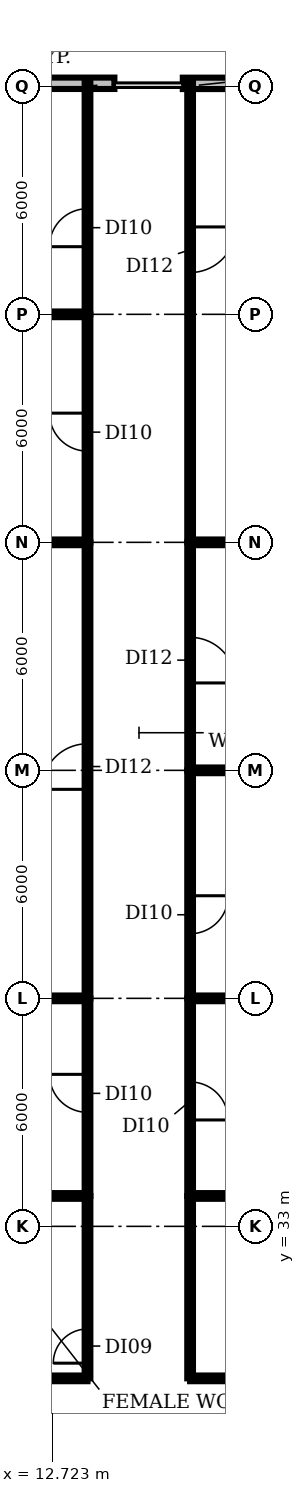
"""IFC4 building model, lengths in metres.
Left out: names, types, materials, properties, quantities, classifications, styles, units other than length and angle.
Written with IfcOpenShell. Run it as: python <this file> out.ifc"""

import sys

from ifc_helpers import new_model, si_unit, direction, frame, frame_2d, origin, place, context, subcontext, project, spatial, rectangle, extrude, element, fill, save


model = new_model("IFC4")
c1 = context("Model", 3, precision=1e-05, world=origin(), true_north=direction((0.0, 1.0)))
c2 = subcontext(c1, "Body", "Model", "MODEL_VIEW")
j1 = project(units=[si_unit("LENGTHUNIT", "METRE"), si_unit("PLANEANGLEUNIT", "RADIAN")], contexts=[c1])
p1 = place(None, origin())
s1 = spatial("IfcSite", under=j1, at=p1, CompositionType="ELEMENT")
p2 = place(p1, origin())
s2 = spatial("IfcBuilding", under=s1, at=p2, CompositionType="ELEMENT")
p3 = place(p2, frame((0.0, 0.0, 306.2)))
s3 = spatial("IfcBuildingStorey", under=s2, at=p3, CompositionType="ELEMENT", Elevation=306.2)
p4 = place(p3, frame((25.03, 63.078, 0.0), z_axis=(0.0, 0.0, 1.0), x_axis=(-1.0, 0.0, 0.0)))
e1 = element("IfcWall", 1, at=p4, inside=s3, PredefinedType="SOLIDWALL", context=c2, shape_type="SweptSolid", body=[
    extrude(rectangle(XDim=8.873, YDim=0.3, at=frame_2d((4.436, 0.0))), origin(), (0.0, 0.0, 1.0), 3.85),
])
p5 = place(p3, frame((14.357, 63.08, 0.0), z_axis=(0.0, 0.0, 1.0), x_axis=(-1.0, 0.0, 0.0)))
e2 = element("IfcWall", 2, at=p5, inside=s3, PredefinedType="SOLIDWALL", context=c2, shape_type="SweptSolid", body=[
    extrude(rectangle(XDim=4.715, YDim=0.3, at=frame_2d((2.357, 0.0))), origin(), (0.0, 0.0, 1.0), 3.85),
])
p6 = place(p3, frame((-3.28, 57.0, 0.0), z_axis=(0.0, 0.0, 1.0), x_axis=(1.0, 0.0, 0.0)))
e3 = element("IfcWall", 3, at=p6, inside=s3, PredefinedType="PARTITIONING", context=c2, shape_type="SweptSolid", body=[
    extrude(rectangle(XDim=16.93, YDim=0.15, at=frame_2d((8.465, 0.0))), origin(), (0.0, 0.0, 1.0), 2.9),
])
p7 = place(p3, frame((-2.81, 51.0, 0.0), z_axis=(0.0, 0.0, 1.0), x_axis=(1.0, 0.0, 0.0)))
e4 = element("IfcWall", 4, at=p7, inside=s3, PredefinedType="PARTITIONING", context=c2, shape_type="SweptSolid", body=[
    extrude(rectangle(XDim=16.46, YDim=0.15, at=frame_2d((8.23, 0.0))), origin(), (0.0, 0.0, 1.0), 2.9),
])
p8 = place(p3, frame((-1.856, 39.0, 0.0), z_axis=(0.0, 0.0, 1.0), x_axis=(1.0, 0.0, 0.0)))
e5 = element("IfcWall", 5, at=p8, inside=s3, PredefinedType="PARTITIONING", context=c2, shape_type="SweptSolid", body=[
    extrude(rectangle(XDim=15.506, YDim=0.15, at=frame_2d((7.753, 0.0))), origin(), (0.0, 0.0, 1.0), 2.9),
])
p9 = place(p3, frame((-1.45, 33.8, 0.0), z_axis=(0.0, 0.0, 1.0), x_axis=(1.0, 0.0, 0.0)))
e6 = element("IfcWall", 6, at=p9, inside=s3, PredefinedType="PARTITIONING", context=c2, shape_type="SweptSolid", body=[
    extrude(rectangle(XDim=15.1, YDim=0.15, at=frame_2d((7.55, 0.0))), origin(), (0.0, 0.0, 1.0), 2.9),
])
p10 = place(p3, frame((8.8, 29.0, 0.0), z_axis=(0.0, 0.0, 1.0), x_axis=(1.0, 0.0, 0.0)))
e7 = element("IfcWall", 7, at=p10, inside=s3, PredefinedType="PARTITIONING", context=c2, shape_type="SweptSolid", body=[
    extrude(rectangle(XDim=4.85, YDim=0.15, at=frame_2d((2.425, 0.0))), origin(), (0.0, 0.0, 1.0), 2.9),
])
p11 = place(p3, frame((13.65, 29.0, 0.0), z_axis=(0.0, 0.0, 1.0), x_axis=(0.0, 1.0, 0.0)))
e8 = element("IfcWall", 8, at=p11, inside=s3, PredefinedType="PARTITIONING", context=c2, shape_type="SweptSolid", body=[
    extrude(rectangle(XDim=4.8, YDim=0.15, at=frame_2d((2.4, 0.0))), origin(), (0.0, 0.0, 1.0), 2.9),
])
p12 = place(p11, frame((0.4, 0.0, 0.0)))
e9 = element("IfcOpeningElement", 9, at=p12, cuts=e8, PredefinedType="OPENING", context=c2, shape_type="SweptSolid", body=[
    extrude(rectangle(XDim=0.9, YDim=2.1, at=frame_2d((0.45, 1.05))), frame((0.0, 0.085, 0.0), z_axis=(0.0, -1.0, 0.0), x_axis=(1.0, 0.0, 0.0)), (0.0, 0.0, 1.0), 0.17),
])
p13 = place(p3, frame((13.65, 33.8, 0.0), z_axis=(0.0, 0.0, 1.0), x_axis=(0.0, 1.0, 0.0)))
e10 = element("IfcWall", 10, at=p13, inside=s3, PredefinedType="PARTITIONING", context=c2, shape_type="SweptSolid", body=[
    extrude(rectangle(XDim=5.2, YDim=0.15, at=frame_2d((2.6, 0.0))), origin(), (0.0, 0.0, 1.0), 2.9),
])
p14 = place(p13, frame((2.2, 0.0, 0.0)))
e11 = element("IfcOpeningElement", 11, at=p14, cuts=e10, PredefinedType="OPENING", context=c2, shape_type="SweptSolid", body=[
    extrude(rectangle(XDim=1.0, YDim=2.1, at=frame_2d((0.5, 1.05))), frame((0.0, 0.085, 0.0), z_axis=(0.0, -1.0, 0.0), x_axis=(1.0, 0.0, 0.0)), (0.0, 0.0, 1.0), 0.17),
])
p15 = place(p3, frame((13.65, 39.0, 0.0), z_axis=(0.0, 0.0, 1.0), x_axis=(0.0, 1.0, 0.0)))
e12 = element("IfcWall", 12, at=p15, inside=s3, PredefinedType="PARTITIONING", context=c2, shape_type="SweptSolid", body=[
    extrude(rectangle(XDim=12.0, YDim=0.15, at=frame_2d((6.0, 0.0))), origin(), (0.0, 0.0, 1.0), 2.9),
])
p16 = place(p15, frame((5.5, 0.0, 0.0)))
e13 = element("IfcOpeningElement", 13, at=p16, cuts=e12, PredefinedType="OPENING", context=c2, shape_type="SweptSolid", body=[
    extrude(rectangle(XDim=1.2, YDim=2.1, at=frame_2d((0.6, 1.05))), frame((0.0, 0.085, 0.0), z_axis=(0.0, -1.0, 0.0), x_axis=(1.0, 0.0, 0.0)), (0.0, 0.0, 1.0), 0.17),
])
p17 = place(p3, frame((13.65, 51.0, 0.0), z_axis=(0.0, 0.0, 1.0), x_axis=(0.0, 1.0, 0.0)))
e14 = element("IfcWall", 14, at=p17, inside=s3, PredefinedType="PARTITIONING", context=c2, shape_type="SweptSolid", body=[
    extrude(rectangle(XDim=6.0, YDim=0.15, at=frame_2d((3.0, 0.0))), origin(), (0.0, 0.0, 1.0), 2.9),
])
p18 = place(p17, frame((2.4, 0.0, 0.0)))
e15 = element("IfcOpeningElement", 15, at=p18, cuts=e14, PredefinedType="OPENING", context=c2, shape_type="SweptSolid", body=[
    extrude(rectangle(XDim=1.0, YDim=2.1, at=frame_2d((0.5, 1.05))), frame((0.0, 0.085, 0.0), z_axis=(0.0, -1.0, 0.0), x_axis=(1.0, 0.0, 0.0)), (0.0, 0.0, 1.0), 0.17),
])
p19 = place(p3, frame((13.65, 57.0, 0.0), z_axis=(0.0, 0.0, 1.0), x_axis=(0.0, 1.0, 0.0)))
e16 = element("IfcWall", 16, at=p19, inside=s3, PredefinedType="PARTITIONING", context=c2, shape_type="SweptSolid", body=[
    extrude(rectangle(XDim=6.09, YDim=0.15, at=frame_2d((3.045, 0.0))), origin(), (0.0, 0.0, 1.0), 2.9),
])
p20 = place(p19, frame((1.78, 0.0, 0.0)))
e17 = element("IfcOpeningElement", 17, at=p20, cuts=e16, PredefinedType="OPENING", context=c2, shape_type="SweptSolid", body=[
    extrude(rectangle(XDim=1.0, YDim=2.1, at=frame_2d((0.5, 1.05))), frame((0.0, 0.085, 0.0), z_axis=(0.0, -1.0, 0.0), x_axis=(1.0, 0.0, 0.0)), (0.0, 0.0, 1.0), 0.17),
])
p21 = place(p3, frame((16.35, 29.0, 0.0), z_axis=(0.0, 0.0, 1.0), x_axis=(0.0, 1.0, 0.0)))
e18 = element("IfcWall", 18, at=p21, inside=s3, PredefinedType="PARTITIONING", context=c2, shape_type="SweptSolid", body=[
    extrude(rectangle(XDim=4.8, YDim=0.15, at=frame_2d((2.4, 0.0))), origin(), (0.0, 0.0, 1.0), 2.9),
])
p22 = place(p3, frame((16.35, 29.0, 0.0), z_axis=(0.0, 0.0, 1.0), x_axis=(1.0, 0.0, 0.0)))
e19 = element("IfcWall", 19, at=p22, inside=s3, PredefinedType="PARTITIONING", context=c2, shape_type="SweptSolid", body=[
    extrude(rectangle(XDim=5.03, YDim=0.15, at=frame_2d((2.515, 0.0))), origin(), (0.0, 0.0, 1.0), 2.9),
])
p23 = place(p3, frame((16.35, 33.8, 0.0), z_axis=(0.0, 0.0, 1.0), x_axis=(1.0, 0.0, 0.0)))
e20 = element("IfcWall", 20, at=p23, inside=s3, PredefinedType="PARTITIONING", context=c2, shape_type="SweptSolid", body=[
    extrude(rectangle(XDim=8.63, YDim=0.15, at=frame_2d((4.315, 0.0))), origin(), (0.0, 0.0, 1.0), 2.9),
])
p24 = place(p3, frame((16.35, 39.0, 0.0), z_axis=(0.0, 0.0, 1.0), x_axis=(0.0, -1.0, 0.0)))
e21 = element("IfcWall", 21, at=p24, inside=s3, PredefinedType="PARTITIONING", context=c2, shape_type="SweptSolid", body=[
    extrude(rectangle(XDim=5.2, YDim=0.15, at=frame_2d((2.6, 0.0))), origin(), (0.0, 0.0, 1.0), 2.9),
])
p25 = place(p24, frame((2.2, 0.0, 0.0)))
e22 = element("IfcOpeningElement", 22, at=p25, cuts=e21, PredefinedType="OPENING", context=c2, shape_type="SweptSolid", body=[
    extrude(rectangle(XDim=1.0, YDim=2.1, at=frame_2d((0.5, 1.05))), frame((0.0, 0.085, 0.0), z_axis=(0.0, -1.0, 0.0), x_axis=(1.0, 0.0, 0.0)), (0.0, 0.0, 1.0), 0.17),
])
p26 = place(p3, frame((16.35, 39.0, 0.0), z_axis=(0.0, 0.0, 1.0), x_axis=(1.0, 0.0, 0.0)))
e23 = element("IfcWall", 23, at=p26, inside=s3, PredefinedType="PARTITIONING", context=c2, shape_type="SweptSolid", body=[
    extrude(rectangle(XDim=8.63, YDim=0.15, at=frame_2d((4.315, 0.0))), origin(), (0.0, 0.0, 1.0), 2.9),
])
p27 = place(p3, frame((16.35, 45.0, 0.0), z_axis=(0.0, 0.0, 1.0), x_axis=(0.0, -1.0, 0.0)))
e24 = element("IfcWall", 24, at=p27, inside=s3, PredefinedType="PARTITIONING", context=c2, shape_type="SweptSolid", body=[
    extrude(rectangle(XDim=6.0, YDim=0.15, at=frame_2d((3.0, 0.0))), origin(), (0.0, 0.0, 1.0), 2.9),
])
p28 = place(p27, frame((3.3, 0.0, 0.0)))
e25 = element("IfcOpeningElement", 25, at=p28, cuts=e24, PredefinedType="OPENING", context=c2, shape_type="SweptSolid", body=[
    extrude(rectangle(XDim=1.0, YDim=2.1, at=frame_2d((0.5, 1.05))), frame((0.0, 0.085, 0.0), z_axis=(0.0, -1.0, 0.0), x_axis=(1.0, 0.0, 0.0)), (0.0, 0.0, 1.0), 0.17),
])
p29 = place(p3, frame((16.35, 45.0, 0.0), z_axis=(0.0, 0.0, 1.0), x_axis=(1.0, 0.0, 0.0)))
e26 = element("IfcWall", 26, at=p29, inside=s3, PredefinedType="PARTITIONING", context=c2, shape_type="SweptSolid", body=[
    extrude(rectangle(XDim=8.63, YDim=0.15, at=frame_2d((4.315, 0.0))), origin(), (0.0, 0.0, 1.0), 2.9),
])
p30 = place(p3, frame((16.35, 51.0, 0.0), z_axis=(0.0, 0.0, 1.0), x_axis=(0.0, -1.0, 0.0)))
e27 = element("IfcWall", 27, at=p30, inside=s3, PredefinedType="PARTITIONING", context=c2, shape_type="SweptSolid", body=[
    extrude(rectangle(XDim=6.0, YDim=0.15, at=frame_2d((3.0, 0.0))), origin(), (0.0, 0.0, 1.0), 2.9),
])
p31 = place(p30, frame((2.5, 0.0, 0.0)))
e28 = element("IfcOpeningElement", 28, at=p31, cuts=e27, PredefinedType="OPENING", context=c2, shape_type="SweptSolid", body=[
    extrude(rectangle(XDim=1.2, YDim=2.1, at=frame_2d((0.6, 1.05))), frame((0.0, 0.085, 0.0), z_axis=(0.0, -1.0, 0.0), x_axis=(1.0, 0.0, 0.0)), (0.0, 0.0, 1.0), 0.17),
])
p32 = place(p3, frame((16.35, 51.0, 0.0), z_axis=(0.0, 0.0, 1.0), x_axis=(1.0, 0.0, 0.0)))
e29 = element("IfcWall", 29, at=p32, inside=s3, PredefinedType="PARTITIONING", context=c2, shape_type="SweptSolid", body=[
    extrude(rectangle(XDim=8.63, YDim=0.15, at=frame_2d((4.315, 0.0))), origin(), (0.0, 0.0, 1.0), 2.9),
])
p33 = place(p3, frame((16.35, 63.09, 0.0), z_axis=(0.0, 0.0, 1.0), x_axis=(0.0, -1.0, 0.0)))
e30 = element("IfcWall", 30, at=p33, inside=s3, PredefinedType="PARTITIONING", context=c2, shape_type="SweptSolid", body=[
    extrude(rectangle(XDim=12.09, YDim=0.15, at=frame_2d((6.045, 0.0))), origin(), (0.0, 0.0, 1.0), 2.9),
])
p34 = place(p33, frame((3.79, 0.0, 0.0)))
e31 = element("IfcOpeningElement", 31, at=p34, cuts=e30, PredefinedType="OPENING", context=c2, shape_type="SweptSolid", body=[
    extrude(rectangle(XDim=1.2, YDim=2.1, at=frame_2d((0.6, 1.05))), frame((0.0, 0.085, 0.0), z_axis=(0.0, -1.0, 0.0), x_axis=(1.0, 0.0, 0.0)), (0.0, 0.0, 1.0), 0.17),
])
p35 = place(p12, origin())
e32 = element("IfcDoor", 32, at=p35, inside=s3, OperationType="SINGLE_SWING_LEFT", PredefinedType="DOOR", context=c2, shape_type="SweptSolid", body=[
    extrude(rectangle(XDim=0.9, YDim=2.1, at=frame_2d((0.45, 1.05))), frame((0.0, 0.025, 0.0), z_axis=(0.0, -1.0, 0.0), x_axis=(1.0, 0.0, 0.0)), (0.0, 0.0, 1.0), 0.05),
])
fill(e9, e32)
p36 = place(p14, origin())
e33 = element("IfcDoor", 33, at=p36, inside=s3, OperationType="SINGLE_SWING_RIGHT", PredefinedType="DOOR", context=c2, shape_type="SweptSolid", body=[
    extrude(rectangle(XDim=1.0, YDim=2.1, at=frame_2d((0.5, 1.05))), frame((0.0, 0.025, 0.0), z_axis=(0.0, -1.0, 0.0), x_axis=(1.0, 0.0, 0.0)), (0.0, 0.0, 1.0), 0.05),
])
fill(e11, e33)
p37 = place(p16, origin())
e34 = element("IfcDoor", 34, at=p37, inside=s3, OperationType="SINGLE_SWING_LEFT", PredefinedType="DOOR", context=c2, shape_type="SweptSolid", body=[
    extrude(rectangle(XDim=1.2, YDim=2.1, at=frame_2d((0.6, 1.05))), frame((0.0, 0.025, 0.0), z_axis=(0.0, -1.0, 0.0), x_axis=(1.0, 0.0, 0.0)), (0.0, 0.0, 1.0), 0.05),
])
fill(e13, e34)
p38 = place(p18, origin())
e35 = element("IfcDoor", 35, at=p38, inside=s3, OperationType="SINGLE_SWING_RIGHT", PredefinedType="DOOR", context=c2, shape_type="SweptSolid", body=[
    extrude(rectangle(XDim=1.0, YDim=2.1, at=frame_2d((0.5, 1.05))), frame((0.0, 0.025, 0.0), z_axis=(0.0, -1.0, 0.0), x_axis=(1.0, 0.0, 0.0)), (0.0, 0.0, 1.0), 0.05),
])
fill(e15, e35)
p39 = place(p20, origin())
e36 = element("IfcDoor", 36, at=p39, inside=s3, OperationType="SINGLE_SWING_LEFT", PredefinedType="DOOR", context=c2, shape_type="SweptSolid", body=[
    extrude(rectangle(XDim=1.0, YDim=2.1, at=frame_2d((0.5, 1.05))), frame((0.0, 0.025, 0.0), z_axis=(0.0, -1.0, 0.0), x_axis=(1.0, 0.0, 0.0)), (0.0, 0.0, 1.0), 0.05),
])
fill(e17, e36)
p40 = place(p25, origin())
e37 = element("IfcDoor", 37, at=p40, inside=s3, OperationType="SINGLE_SWING_RIGHT", PredefinedType="DOOR", context=c2, shape_type="SweptSolid", body=[
    extrude(rectangle(XDim=1.0, YDim=2.1, at=frame_2d((0.5, 1.05))), frame((0.0, 0.025, 0.0), z_axis=(0.0, -1.0, 0.0), x_axis=(1.0, 0.0, 0.0)), (0.0, 0.0, 1.0), 0.05),
])
fill(e22, e37)
p41 = place(p28, origin())
e38 = element("IfcDoor", 38, at=p41, inside=s3, OperationType="SINGLE_SWING_LEFT", PredefinedType="DOOR", context=c2, shape_type="SweptSolid", body=[
    extrude(rectangle(XDim=1.0, YDim=2.1, at=frame_2d((0.5, 1.05))), frame((0.0, 0.025, 0.0), z_axis=(0.0, -1.0, 0.0), x_axis=(1.0, 0.0, 0.0)), (0.0, 0.0, 1.0), 0.05),
])
fill(e25, e38)
p42 = place(p31, origin())
e39 = element("IfcDoor", 39, at=p42, inside=s3, OperationType="SINGLE_SWING_RIGHT", PredefinedType="DOOR", context=c2, shape_type="SweptSolid", body=[
    extrude(rectangle(XDim=1.2, YDim=2.1, at=frame_2d((0.6, 1.05))), frame((0.0, 0.025, 0.0), z_axis=(0.0, -1.0, 0.0), x_axis=(1.0, 0.0, 0.0)), (0.0, 0.0, 1.0), 0.05),
])
fill(e28, e39)
p43 = place(p34, origin())
e40 = element("IfcDoor", 40, at=p43, inside=s3, OperationType="SINGLE_SWING_LEFT", PredefinedType="DOOR", context=c2, shape_type="SweptSolid", body=[
    extrude(rectangle(XDim=1.2, YDim=2.1, at=frame_2d((0.6, 1.05))), frame((0.0, 0.025, 0.0), z_axis=(0.0, -1.0, 0.0), x_axis=(1.0, 0.0, 0.0)), (0.0, 0.0, 1.0), 0.05),
])
fill(e31, e40)
save(model, sys.argv[1])
